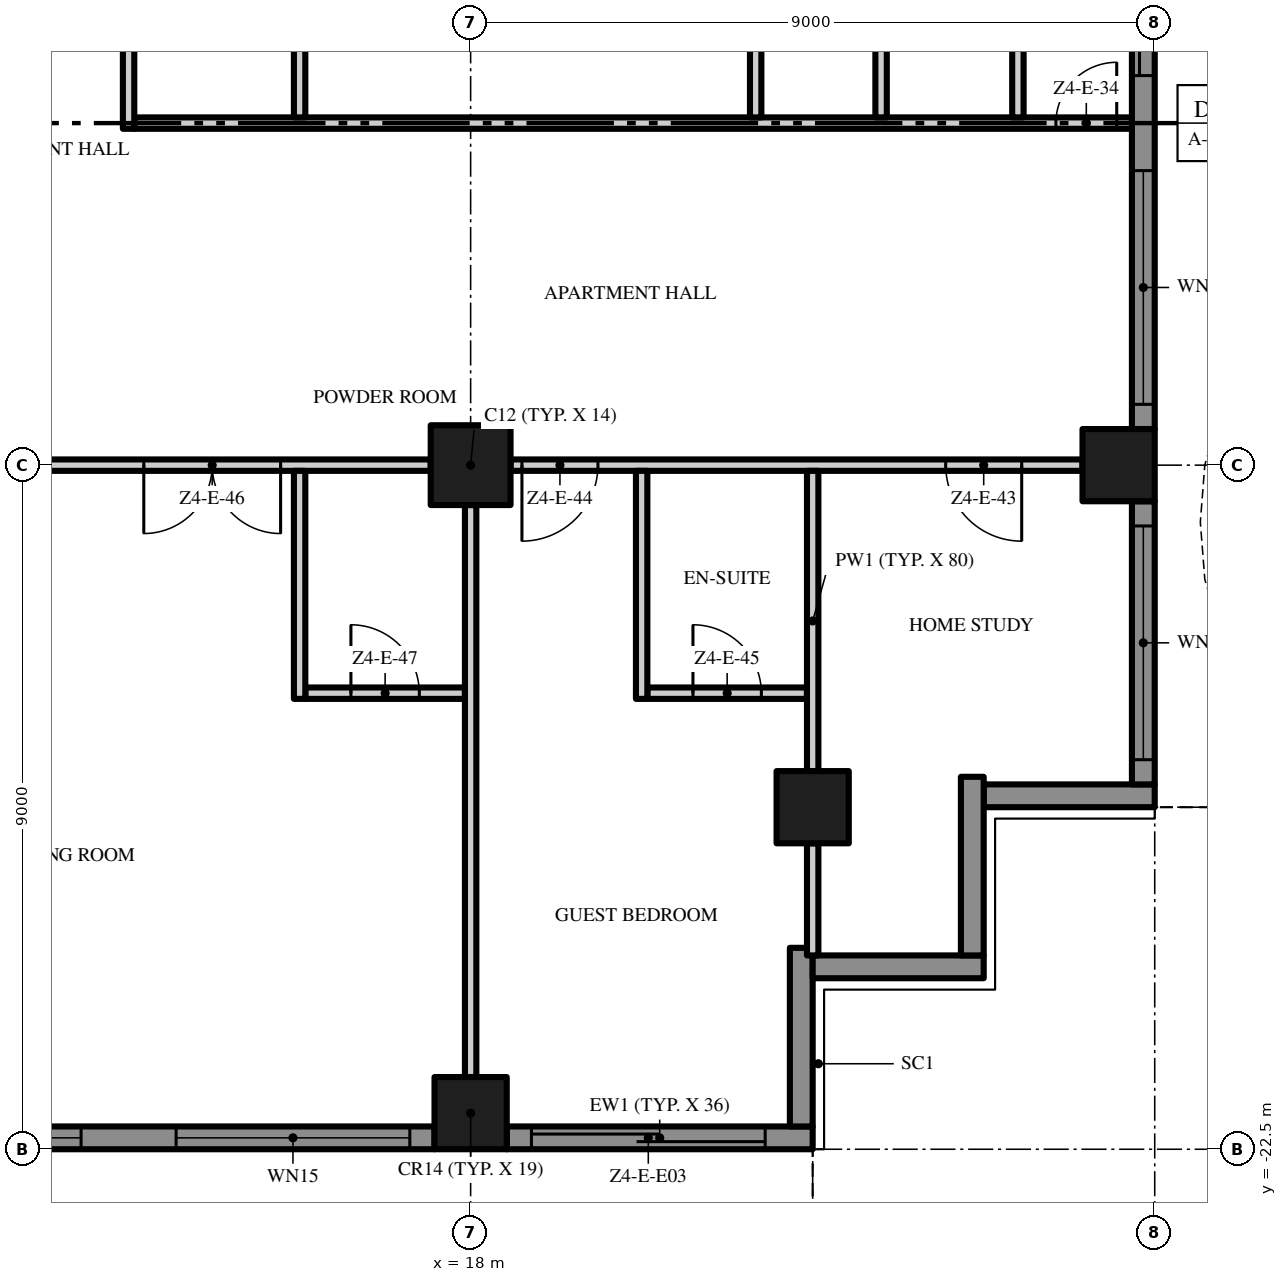
"""IFC4 building model, lengths in metres.
Left out: names, types, materials, properties, quantities, classifications, styles, units other than length and angle.
Written with IfcOpenShell. Run it as: python <this file> out.ifc"""

import sys

from ifc_helpers import new_model, si_unit, direction, frame, frame_2d, origin, origin_2d, place, context, subcontext, project, spatial, polyline, rectangle, outline, extrude, element, fill, save


model = new_model("IFC4")
c1 = context("Model", 3, precision=1e-05, world=origin(), true_north=direction((0.0, 1.0)))
c2 = subcontext(c1, "Body", "Model", "MODEL_VIEW")
j1 = project(units=[si_unit("LENGTHUNIT", "METRE"), si_unit("PLANEANGLEUNIT", "RADIAN")], contexts=[c1])
p1 = place(None, origin())
s1 = spatial("IfcSite", under=j1, at=p1, CompositionType="ELEMENT")
p2 = place(p1, origin())
s2 = spatial("IfcBuilding", under=s1, at=p2, CompositionType="ELEMENT")
p3 = place(p2, frame((0.0, 0.0, 226.2)))
s3 = spatial("IfcBuildingStorey", under=s2, at=p3, CompositionType="ELEMENT", Elevation=226.2)
p4 = place(p3, frame((18.0, -13.5, 0.0), z_axis=(0.0, 0.0, 1.0), x_axis=(1.0, 0.0, 0.0)))
e1 = element("IfcColumn", 1, at=p4, inside=s3, PredefinedType="COLUMN", context=c2, shape_type="SweptSolid", body=[
    extrude(rectangle(XDim=1.05, YDim=1.05, at=origin_2d()), origin(), (0.0, 0.0, 1.0), 3.5),
])
for number, where, z_axis, x_axis in (
    (2, (18.0, -22.025, 0.0), (0.0, 0.0, 1.0), (1.0, 0.0, 0.0)),
    (3, (26.525, -13.5, 0.0), (0.0, 0.0, 1.0), (1.0, 0.0, 0.0)),
    (4, (22.5, -18.0, 0.0), (0.0, 0.0, 1.0), (1.0, 0.0, 0.0)),
):
    element("IfcColumn", number, at=place(p3, frame(where, z_axis=z_axis, x_axis=x_axis)), inside=s3, PredefinedType="COLUMN", context=c2, shape_type="SweptSolid", body=[
        extrude(rectangle(XDim=0.95, YDim=0.95, at=origin_2d()), origin(), (0.0, 0.0, 1.0), 3.5),
    ])
p5 = place(p3, frame((17.525, -22.35, 0.0), z_axis=(0.0, 0.0, 1.0), x_axis=(-1.0, 0.0, 0.0)))
e5 = element("IfcWall", 5, at=p5, inside=s3, PredefinedType="SOLIDWALL", context=c2, shape_type="SweptSolid", body=[
    extrude(rectangle(XDim=8.05, YDim=0.3, at=frame_2d((4.025, 0.0))), origin(), (0.0, 0.0, 1.0), 3.5),
])
p6 = place(p5, frame((4.65, 0.0, 0.45)))
e6 = element("IfcOpeningElement", 6, at=p6, cuts=e5, PredefinedType="OPENING", context=c2, shape_type="SweptSolid", body=[
    extrude(rectangle(XDim=3.075, YDim=2.65, at=frame_2d((1.538, 1.325))), frame((0.0, 0.16, 0.0), z_axis=(0.0, -1.0, 0.0), x_axis=(1.0, 0.0, 0.0)), (0.0, 0.0, 1.0), 0.32),
])
p7 = place(p5, frame((0.325, 0.0, 0.45)))
e7 = element("IfcOpeningElement", 7, at=p7, cuts=e5, PredefinedType="OPENING", context=c2, shape_type="SweptSolid", body=[
    extrude(rectangle(XDim=3.075, YDim=2.65, at=frame_2d((1.538, 1.325))), frame((0.0, 0.16, 0.0), z_axis=(0.0, -1.0, 0.0), x_axis=(1.0, 0.0, 0.0)), (0.0, 0.0, 1.0), 0.32),
])
p8 = place(p3, frame((22.5, -22.35, 0.0), z_axis=(0.0, 0.0, 1.0), x_axis=(-1.0, 0.0, 0.0)))
e8 = element("IfcWall", 8, at=p8, inside=s3, PredefinedType="SOLIDWALL", context=c2, shape_type="SweptSolid", body=[
    extrude(rectangle(XDim=4.025, YDim=0.3, at=frame_2d((2.013, 0.0))), origin(), (0.0, 0.0, 1.0), 3.5),
])
p9 = place(p8, frame((0.625, 0.0, 0.0)))
e9 = element("IfcOpeningElement", 9, at=p9, cuts=e8, PredefinedType="OPENING", context=c2, shape_type="SweptSolid", body=[
    extrude(rectangle(XDim=3.075, YDim=2.4, at=frame_2d((1.538, 1.2))), frame((0.0, 0.16, 0.0), z_axis=(0.0, -1.0, 0.0), x_axis=(1.0, 0.0, 0.0)), (0.0, 0.0, 1.0), 0.32),
])
p10 = place(p3, frame((22.35, -19.85, 0.0), z_axis=(0.0, 0.0, 1.0), x_axis=(0.0, -1.0, 0.0)))
e10 = element("IfcWall", 10, at=p10, inside=s3, PredefinedType="SOLIDWALL", context=c2, shape_type="SweptSolid", body=[
    extrude(rectangle(XDim=2.35, YDim=0.3, at=frame_2d((1.175, 0.0))), origin(), (0.0, 0.0, 1.0), 3.5),
])
p11 = place(p3, frame((24.75, -20.1, 0.0), z_axis=(0.0, 0.0, 1.0), x_axis=(-1.0, 0.0, 0.0)))
e11 = element("IfcWall", 11, at=p11, inside=s3, PredefinedType="SOLIDWALL", context=c2, shape_type="SweptSolid", body=[
    extrude(rectangle(XDim=2.25, YDim=0.3, at=frame_2d((1.125, 0.0))), origin(), (0.0, 0.0, 1.0), 3.5),
])
p12 = place(p3, frame((24.6, -17.6, 0.0), z_axis=(0.0, 0.0, 1.0), x_axis=(0.0, -1.0, 0.0)))
e12 = element("IfcWall", 12, at=p12, inside=s3, PredefinedType="SOLIDWALL", context=c2, shape_type="SweptSolid", body=[
    extrude(rectangle(XDim=2.35, YDim=0.3, at=frame_2d((1.175, 0.0))), origin(), (0.0, 0.0, 1.0), 3.5),
])
p13 = place(p3, frame((27.0, -17.85, 0.0), z_axis=(0.0, 0.0, 1.0), x_axis=(-1.0, 0.0, 0.0)))
e13 = element("IfcWall", 13, at=p13, inside=s3, PredefinedType="SOLIDWALL", context=c2, shape_type="SweptSolid", body=[
    extrude(rectangle(XDim=2.25, YDim=0.3, at=frame_2d((1.125, 0.0))), origin(), (0.0, 0.0, 1.0), 3.5),
])
p14 = place(p3, frame((26.85, -13.975, 0.0), z_axis=(0.0, 0.0, 1.0), x_axis=(0.0, -1.0, 0.0)))
e14 = element("IfcWall", 14, at=p14, inside=s3, PredefinedType="SOLIDWALL", context=c2, shape_type="SweptSolid", body=[
    extrude(rectangle(XDim=3.725, YDim=0.3, at=frame_2d((1.863, 0.0))), origin(), (0.0, 0.0, 1.0), 3.5),
])
p15 = place(p14, frame((0.325, 0.0, 0.45)))
e15 = element("IfcOpeningElement", 15, at=p15, cuts=e14, PredefinedType="OPENING", context=c2, shape_type="SweptSolid", body=[
    extrude(rectangle(XDim=3.075, YDim=2.65, at=frame_2d((1.538, 1.325))), frame((0.0, 0.16, 0.0), z_axis=(0.0, -1.0, 0.0), x_axis=(1.0, 0.0, 0.0)), (0.0, 0.0, 1.0), 0.32),
])
p16 = place(p3, frame((26.85, -4.975, 0.0), z_axis=(0.0, 0.0, 1.0), x_axis=(0.0, -1.0, 0.0)))
e16 = element("IfcWall", 16, at=p16, inside=s3, PredefinedType="SOLIDWALL", context=c2, shape_type="SweptSolid", body=[
    extrude(rectangle(XDim=8.05, YDim=0.3, at=frame_2d((4.025, 0.0))), origin(), (0.0, 0.0, 1.0), 3.5),
])
p17 = place(p16, frame((4.65, 0.0, 0.45)))
e17 = element("IfcOpeningElement", 17, at=p17, cuts=e16, PredefinedType="OPENING", context=c2, shape_type="SweptSolid", body=[
    extrude(rectangle(XDim=3.075, YDim=2.65, at=frame_2d((1.538, 1.325))), frame((0.0, 0.16, 0.0), z_axis=(0.0, -1.0, 0.0), x_axis=(1.0, 0.0, 0.0)), (0.0, 0.0, 1.0), 0.32),
])
p18 = place(p16, frame((0.325, 0.0, 0.0)))
e18 = element("IfcOpeningElement", 18, at=p18, cuts=e16, PredefinedType="OPENING", context=c2, shape_type="SweptSolid", body=[
    extrude(rectangle(XDim=3.075, YDim=2.4, at=frame_2d((1.538, 1.2))), frame((0.0, 0.16, 0.0), z_axis=(0.0, -1.0, 0.0), x_axis=(1.0, 0.0, 0.0)), (0.0, 0.0, 1.0), 0.32),
])
p19 = place(p3, origin())
e19 = element("IfcWall", 19, at=p19, inside=s3, PredefinedType="USERDEFINED", context=c2, shape_type="SweptSolid", body=[
    extrude(outline(polyline([(-22.5, -24.3), (-21.0, -23.595), (-19.5, -23.159), (-18.75, -23.1), (-18.0, -23.159), (-16.5, -23.595), (-15.0, -24.3), (-13.5, -25.005), (-12.0, -25.441), (-11.25, -25.5), (-10.5, -25.441), (-9.0, -25.005), (-7.5, -24.3), (-6.0, -23.595), (-4.5, -23.159), (-3.75, -23.1), (-3.0, -23.159), (-1.5, -23.595), (0.0, -24.3), (1.5, -25.005), (3.0, -25.441), (3.75, -25.5), (4.5, -25.441), (6.0, -25.005), (7.5, -24.3), (9.0, -23.595), (10.5, -23.159), (11.25, -23.1), (12.0, -23.159), (13.5, -23.595), (15.0, -24.3), (16.5, -25.005), (18.0, -25.441), (18.75, -25.5), (19.5, -25.441), (21.0, -25.005), (22.5, -24.3), (22.394, -24.074), (20.911, -24.771), (19.455, -25.194), (18.75, -25.249), (18.045, -25.194), (16.589, -24.771), (15.106, -24.074), (13.589, -23.36), (12.045, -22.911), (11.25, -22.849), (10.455, -22.911), (8.911, -23.36), (7.394, -24.074), (5.911, -24.771), (4.455, -25.194), (3.75, -25.249), (3.045, -25.194), (1.589, -24.771), (0.106, -24.074), (-1.411, -23.36), (-2.955, -22.911), (-3.75, -22.849), (-4.545, -22.911), (-6.089, -23.36), (-7.606, -24.074), (-9.089, -24.771), (-10.545, -25.194), (-11.25, -25.249), (-11.955, -25.194), (-13.411, -24.771), (-14.894, -24.074), (-16.411, -23.36), (-17.955, -22.911), (-18.75, -22.849), (-19.545, -22.911), (-21.089, -23.36), (-22.606, -24.074), (-22.5, -24.3)])), origin(), (0.0, 0.0, 1.0), 0.9),
])
p20 = place(p3, origin())
e20 = element("IfcWall", 20, at=p20, inside=s3, PredefinedType="USERDEFINED", context=c2, shape_type="SweptSolid", body=[
    extrude(outline(polyline([(28.8, -18.0), (28.095, -16.5), (27.659, -15.0), (27.6, -14.25), (27.659, -13.5), (28.095, -12.0), (28.8, -10.5), (29.505, -9.0), (29.941, -7.5), (30.0, -6.75), (29.941, -6.0), (29.505, -4.5), (28.8, -3.0), (28.095, -1.5), (27.659, 0.0), (27.6, 0.75), (27.659, 1.5), (28.095, 3.0), (28.8, 4.5), (29.505, 6.0), (29.941, 7.5), (30.0, 8.25), (29.941, 9.0), (29.505, 10.5), (28.8, 12.0), (28.095, 13.5), (27.659, 15.0), (27.6, 15.75), (27.659, 16.5), (28.095, 18.0), (27.855, 18.07), (27.411, 16.545), (27.349, 15.75), (27.411, 14.955), (27.86, 13.411), (28.574, 11.894), (29.271, 10.411), (29.694, 8.955), (29.749, 8.25), (29.694, 7.545), (29.271, 6.089), (28.574, 4.606), (27.86, 3.089), (27.411, 1.545), (27.349, 0.75), (27.411, -0.045), (27.86, -1.589), (28.574, -3.106), (29.271, -4.589), (29.694, -6.045), (29.749, -6.75), (29.694, -7.455), (29.271, -8.911), (28.574, -10.394), (27.86, -11.911), (27.411, -13.455), (27.349, -14.25), (27.411, -15.045), (27.86, -16.589), (28.574, -18.106), (28.8, -18.0)])), origin(), (0.0, 0.0, 1.0), 0.9),
])
p21 = place(p3, frame((15.825, -16.5, 0.0), z_axis=(0.0, 0.0, 1.0), x_axis=(1.0, 0.0, 0.0)))
e21 = element("IfcWall", 21, at=p21, inside=s3, PredefinedType="PARTITIONING", context=c2, shape_type="SweptSolid", body=[
    extrude(rectangle(XDim=2.1, YDim=0.15, at=frame_2d((1.05, 0.0))), origin(), (0.0, 0.0, 1.0), 3.5),
])
p22 = place(p21, frame((0.6, 0.0, 0.0)))
e22 = element("IfcOpeningElement", 22, at=p22, cuts=e21, PredefinedType="OPENING", context=c2, shape_type="SweptSolid", body=[
    extrude(rectangle(XDim=0.9, YDim=2.1, at=frame_2d((0.45, 1.05))), frame((0.0, 0.085, 0.0), z_axis=(0.0, -1.0, 0.0), x_axis=(1.0, 0.0, 0.0)), (0.0, 0.0, 1.0), 0.17),
])
p23 = place(p3, frame((20.325, -16.5, 0.0), z_axis=(0.0, 0.0, 1.0), x_axis=(1.0, 0.0, 0.0)))
e23 = element("IfcWall", 23, at=p23, inside=s3, PredefinedType="PARTITIONING", context=c2, shape_type="SweptSolid", body=[
    extrude(rectangle(XDim=2.1, YDim=0.15, at=frame_2d((1.05, 0.0))), origin(), (0.0, 0.0, 1.0), 3.5),
])
p24 = place(p23, frame((0.6, 0.0, 0.0)))
e24 = element("IfcOpeningElement", 24, at=p24, cuts=e23, PredefinedType="OPENING", context=c2, shape_type="SweptSolid", body=[
    extrude(rectangle(XDim=0.9, YDim=2.1, at=frame_2d((0.45, 1.05))), frame((0.0, 0.085, 0.0), z_axis=(0.0, -1.0, 0.0), x_axis=(1.0, 0.0, 0.0)), (0.0, 0.0, 1.0), 0.17),
])
p25 = place(p3, frame((17.475, -13.5, 0.0), z_axis=(0.0, 0.0, 1.0), x_axis=(-1.0, 0.0, 0.0)))
e25 = element("IfcWall", 25, at=p25, inside=s3, PredefinedType="PARTITIONING", context=c2, shape_type="SweptSolid", body=[
    extrude(rectangle(XDim=7.95, YDim=0.15, at=frame_2d((3.975, 0.0))), origin(), (0.0, 0.0, 1.0), 3.5),
])
p26 = place(p25, frame((1.975, 0.0, 0.0)))
e26 = element("IfcOpeningElement", 26, at=p26, cuts=e25, PredefinedType="OPENING", context=c2, shape_type="SweptSolid", body=[
    extrude(rectangle(XDim=1.8, YDim=2.4, at=frame_2d((0.9, 1.2))), frame((0.0, 0.085, 0.0), z_axis=(0.0, -1.0, 0.0), x_axis=(1.0, 0.0, 0.0)), (0.0, 0.0, 1.0), 0.17),
])
p27 = place(p3, frame((26.05, -13.5, 0.0), z_axis=(0.0, 0.0, 1.0), x_axis=(-1.0, 0.0, 0.0)))
e27 = element("IfcWall", 27, at=p27, inside=s3, PredefinedType="PARTITIONING", context=c2, shape_type="SweptSolid", body=[
    extrude(rectangle(XDim=7.525, YDim=0.15, at=frame_2d((3.763, 0.0))), origin(), (0.0, 0.0, 1.0), 3.5),
])
p28 = place(p27, frame((0.8, 0.0, 0.0)))
e28 = element("IfcOpeningElement", 28, at=p28, cuts=e27, PredefinedType="OPENING", context=c2, shape_type="SweptSolid", body=[
    extrude(rectangle(XDim=1.0, YDim=2.4, at=frame_2d((0.5, 1.2))), frame((0.0, 0.085, 0.0), z_axis=(0.0, -1.0, 0.0), x_axis=(1.0, 0.0, 0.0)), (0.0, 0.0, 1.0), 0.17),
])
p29 = place(p27, frame((6.375, 0.0, 0.0)))
e29 = element("IfcOpeningElement", 29, at=p29, cuts=e27, PredefinedType="OPENING", context=c2, shape_type="SweptSolid", body=[
    extrude(rectangle(XDim=1.0, YDim=2.4, at=frame_2d((0.5, 1.2))), frame((0.0, 0.085, 0.0), z_axis=(0.0, -1.0, 0.0), x_axis=(1.0, 0.0, 0.0)), (0.0, 0.0, 1.0), 0.17),
])
p30 = place(p3, frame((13.575, -9.0, 0.0), z_axis=(0.0, 0.0, 1.0), x_axis=(1.0, 0.0, 0.0)))
e30 = element("IfcWall", 30, at=p30, inside=s3, PredefinedType="PARTITIONING", context=c2, shape_type="SweptSolid", body=[
    extrude(rectangle(XDim=13.125, YDim=0.15, at=frame_2d((6.562, 0.0))), origin(), (0.0, 0.0, 1.0), 3.5),
])
p31 = place(p30, frame((12.125, 0.0, 0.0)))
e31 = element("IfcOpeningElement", 31, at=p31, cuts=e30, PredefinedType="OPENING", context=c2, shape_type="SweptSolid", body=[
    extrude(rectangle(XDim=0.8, YDim=2.0, at=frame_2d((0.4, 1.0))), frame((0.0, 0.085, 0.0), z_axis=(0.0, -1.0, 0.0), x_axis=(1.0, 0.0, 0.0)), (0.0, 0.0, 1.0), 0.17),
])
p32 = place(p3, frame((13.5, -4.425, 0.0), z_axis=(0.0, 0.0, 1.0), x_axis=(0.0, -1.0, 0.0)))
e32 = element("IfcWall", 32, at=p32, inside=s3, PredefinedType="PARTITIONING", context=c2, shape_type="SweptSolid", body=[
    extrude(rectangle(XDim=4.65, YDim=0.15, at=frame_2d((2.325, 0.0))), origin(), (0.0, 0.0, 1.0), 3.5),
])
p33 = place(p32, frame((1.875, 0.0, 0.0)))
e33 = element("IfcOpeningElement", 33, at=p33, cuts=e32, PredefinedType="OPENING", context=c2, shape_type="SweptSolid", body=[
    extrude(rectangle(XDim=0.9, YDim=2.1, at=frame_2d((0.45, 1.05))), frame((0.0, 0.085, 0.0), z_axis=(0.0, -1.0, 0.0), x_axis=(1.0, 0.0, 0.0)), (0.0, 0.0, 1.0), 0.17),
])
p34 = place(p3, frame((15.75, -16.575, 0.0), z_axis=(0.0, 0.0, 1.0), x_axis=(0.0, 1.0, 0.0)))
e34 = element("IfcWall", 34, at=p34, inside=s3, PredefinedType="PARTITIONING", context=c2, shape_type="SweptSolid", body=[
    extrude(rectangle(XDim=3.0, YDim=0.15, at=frame_2d((1.5, 0.0))), origin(), (0.0, 0.0, 1.0), 3.5),
])
p35 = place(p3, frame((15.75, -8.925, 0.0), z_axis=(0.0, 0.0, 1.0), x_axis=(0.0, 1.0, 0.0)))
e35 = element("IfcWall", 35, at=p35, inside=s3, PredefinedType="PARTITIONING", context=c2, shape_type="SweptSolid", body=[
    extrude(rectangle(XDim=4.35, YDim=0.15, at=frame_2d((2.175, 0.0))), origin(), (0.0, 0.0, 1.0), 3.5),
])
p36 = place(p3, frame((18.0, -21.55, 0.0), z_axis=(0.0, 0.0, 1.0), x_axis=(0.0, 1.0, 0.0)))
e36 = element("IfcWall", 36, at=p36, inside=s3, PredefinedType="PARTITIONING", context=c2, shape_type="SweptSolid", body=[
    extrude(rectangle(XDim=7.525, YDim=0.15, at=frame_2d((3.763, 0.0))), origin(), (0.0, 0.0, 1.0), 3.5),
])
p37 = place(p3, frame((20.25, -16.575, 0.0), z_axis=(0.0, 0.0, 1.0), x_axis=(0.0, 1.0, 0.0)))
e37 = element("IfcWall", 37, at=p37, inside=s3, PredefinedType="PARTITIONING", context=c2, shape_type="SweptSolid", body=[
    extrude(rectangle(XDim=3.0, YDim=0.15, at=frame_2d((1.5, 0.0))), origin(), (0.0, 0.0, 1.0), 3.5),
])
p38 = place(p3, frame((21.75, -8.925, 0.0), z_axis=(0.0, 0.0, 1.0), x_axis=(0.0, 1.0, 0.0)))
e38 = element("IfcWall", 38, at=p38, inside=s3, PredefinedType="PARTITIONING", context=c2, shape_type="SweptSolid", body=[
    extrude(rectangle(XDim=4.35, YDim=0.15, at=frame_2d((2.175, 0.0))), origin(), (0.0, 0.0, 1.0), 3.5),
])
p39 = place(p3, frame((22.5, -19.95, 0.0), z_axis=(0.0, 0.0, 1.0), x_axis=(0.0, 1.0, 0.0)))
e39 = element("IfcWall", 39, at=p39, inside=s3, PredefinedType="PARTITIONING", context=c2, shape_type="SweptSolid", body=[
    extrude(rectangle(XDim=1.475, YDim=0.15, at=frame_2d((0.738, 0.0))), origin(), (0.0, 0.0, 1.0), 3.5),
])
p40 = place(p3, frame((22.5, -17.525, 0.0), z_axis=(0.0, 0.0, 1.0), x_axis=(0.0, 1.0, 0.0)))
e40 = element("IfcWall", 40, at=p40, inside=s3, PredefinedType="PARTITIONING", context=c2, shape_type="SweptSolid", body=[
    extrude(rectangle(XDim=3.95, YDim=0.15, at=frame_2d((1.975, 0.0))), origin(), (0.0, 0.0, 1.0), 3.5),
])
for number, where, z_axis, x_axis in (
    (41, (23.4, -8.925, 0.0), (0.0, 0.0, 1.0), (0.0, 1.0, 0.0)),
    (42, (25.2, -8.925, 0.0), (0.0, 0.0, 1.0), (0.0, 1.0, 0.0)),
):
    element("IfcWall", number, at=place(p3, frame(where, z_axis=z_axis, x_axis=x_axis)), inside=s3, PredefinedType="PARTITIONING", context=c2, shape_type="SweptSolid", body=[
        extrude(rectangle(XDim=4.35, YDim=0.15, at=frame_2d((2.175, 0.0))), origin(), (0.0, 0.0, 1.0), 3.5),
    ])
p41 = place(p6, origin())
e43 = element("IfcWindow", 43, at=p41, inside=s3, PartitioningType="SINGLE_PANEL", PredefinedType="WINDOW", context=c2, shape_type="SweptSolid", body=[
    extrude(rectangle(XDim=3.075, YDim=2.65, at=frame_2d((1.538, 1.325))), frame((0.0, 0.03, 0.0), z_axis=(0.0, -1.0, 0.0), x_axis=(1.0, 0.0, 0.0)), (0.0, 0.0, 1.0), 0.06),
])
fill(e6, e43)
p42 = place(p7, origin())
e44 = element("IfcWindow", 44, at=p42, inside=s3, PartitioningType="SINGLE_PANEL", PredefinedType="WINDOW", context=c2, shape_type="SweptSolid", body=[
    extrude(rectangle(XDim=3.075, YDim=2.65, at=frame_2d((1.538, 1.325))), frame((0.0, 0.03, 0.0), z_axis=(0.0, -1.0, 0.0), x_axis=(1.0, 0.0, 0.0)), (0.0, 0.0, 1.0), 0.06),
])
fill(e7, e44)
p43 = place(p9, origin())
e45 = element("IfcDoor", 45, at=p43, inside=s3, OperationType="SINGLE_SWING_LEFT", PredefinedType="DOOR", context=c2, shape_type="SweptSolid", body=[
    extrude(rectangle(XDim=3.075, YDim=2.4, at=frame_2d((1.538, 1.2))), frame((0.0, 0.025, 0.0), z_axis=(0.0, -1.0, 0.0), x_axis=(1.0, 0.0, 0.0)), (0.0, 0.0, 1.0), 0.05),
])
fill(e9, e45)
p44 = place(p15, origin())
e46 = element("IfcWindow", 46, at=p44, inside=s3, PartitioningType="SINGLE_PANEL", PredefinedType="WINDOW", context=c2, shape_type="SweptSolid", body=[
    extrude(rectangle(XDim=3.075, YDim=2.65, at=frame_2d((1.538, 1.325))), frame((0.0, 0.03, 0.0), z_axis=(0.0, -1.0, 0.0), x_axis=(1.0, 0.0, 0.0)), (0.0, 0.0, 1.0), 0.06),
])
fill(e15, e46)
p45 = place(p17, origin())
e47 = element("IfcWindow", 47, at=p45, inside=s3, PartitioningType="SINGLE_PANEL", PredefinedType="WINDOW", context=c2, shape_type="SweptSolid", body=[
    extrude(rectangle(XDim=3.075, YDim=2.65, at=frame_2d((1.538, 1.325))), frame((0.0, 0.03, 0.0), z_axis=(0.0, -1.0, 0.0), x_axis=(1.0, 0.0, 0.0)), (0.0, 0.0, 1.0), 0.06),
])
fill(e17, e47)
p46 = place(p18, origin())
e48 = element("IfcDoor", 48, at=p46, inside=s3, OperationType="SINGLE_SWING_LEFT", PredefinedType="DOOR", context=c2, shape_type="SweptSolid", body=[
    extrude(rectangle(XDim=3.075, YDim=2.4, at=frame_2d((1.538, 1.2))), frame((0.0, 0.025, 0.0), z_axis=(0.0, -1.0, 0.0), x_axis=(1.0, 0.0, 0.0)), (0.0, 0.0, 1.0), 0.05),
])
fill(e18, e48)
p47 = place(p31, origin())
e49 = element("IfcDoor", 49, at=p47, inside=s3, OperationType="SINGLE_SWING_RIGHT", PredefinedType="DOOR", context=c2, shape_type="SweptSolid", body=[
    extrude(rectangle(XDim=0.8, YDim=2.0, at=frame_2d((0.4, 1.0))), frame((0.0, 0.025, 0.0), z_axis=(0.0, -1.0, 0.0), x_axis=(1.0, 0.0, 0.0)), (0.0, 0.0, 1.0), 0.05),
])
fill(e31, e49)
p48 = place(p28, origin())
e50 = element("IfcDoor", 50, at=p48, inside=s3, OperationType="SINGLE_SWING_LEFT", PredefinedType="DOOR", context=c2, shape_type="SweptSolid", body=[
    extrude(rectangle(XDim=1.0, YDim=2.4, at=frame_2d((0.5, 1.2))), frame((0.0, 0.025, 0.0), z_axis=(0.0, -1.0, 0.0), x_axis=(1.0, 0.0, 0.0)), (0.0, 0.0, 1.0), 0.05),
])
fill(e28, e50)
p49 = place(p29, origin())
e51 = element("IfcDoor", 51, at=p49, inside=s3, OperationType="SINGLE_SWING_RIGHT", PredefinedType="DOOR", context=c2, shape_type="SweptSolid", body=[
    extrude(rectangle(XDim=1.0, YDim=2.4, at=frame_2d((0.5, 1.2))), frame((0.0, 0.025, 0.0), z_axis=(0.0, -1.0, 0.0), x_axis=(1.0, 0.0, 0.0)), (0.0, 0.0, 1.0), 0.05),
])
fill(e29, e51)
p50 = place(p24, origin())
e52 = element("IfcDoor", 52, at=p50, inside=s3, OperationType="SINGLE_SWING_LEFT", PredefinedType="DOOR", context=c2, shape_type="SweptSolid", body=[
    extrude(rectangle(XDim=0.9, YDim=2.1, at=frame_2d((0.45, 1.05))), frame((0.0, 0.025, 0.0), z_axis=(0.0, -1.0, 0.0), x_axis=(1.0, 0.0, 0.0)), (0.0, 0.0, 1.0), 0.05),
])
fill(e24, e52)
p51 = place(p26, origin())
e53 = element("IfcDoor", 53, at=p51, inside=s3, OperationType="DOUBLE_DOOR_SINGLE_SWING", PredefinedType="DOOR", context=c2, shape_type="SweptSolid", body=[
    extrude(rectangle(XDim=1.8, YDim=2.4, at=frame_2d((0.9, 1.2))), frame((0.0, 0.025, 0.0), z_axis=(0.0, -1.0, 0.0), x_axis=(1.0, 0.0, 0.0)), (0.0, 0.0, 1.0), 0.05),
])
fill(e26, e53)
p52 = place(p22, origin())
e54 = element("IfcDoor", 54, at=p52, inside=s3, OperationType="SINGLE_SWING_LEFT", PredefinedType="DOOR", context=c2, shape_type="SweptSolid", body=[
    extrude(rectangle(XDim=0.9, YDim=2.1, at=frame_2d((0.45, 1.05))), frame((0.0, 0.025, 0.0), z_axis=(0.0, -1.0, 0.0), x_axis=(1.0, 0.0, 0.0)), (0.0, 0.0, 1.0), 0.05),
])
fill(e22, e54)
save(model, sys.argv[1])
